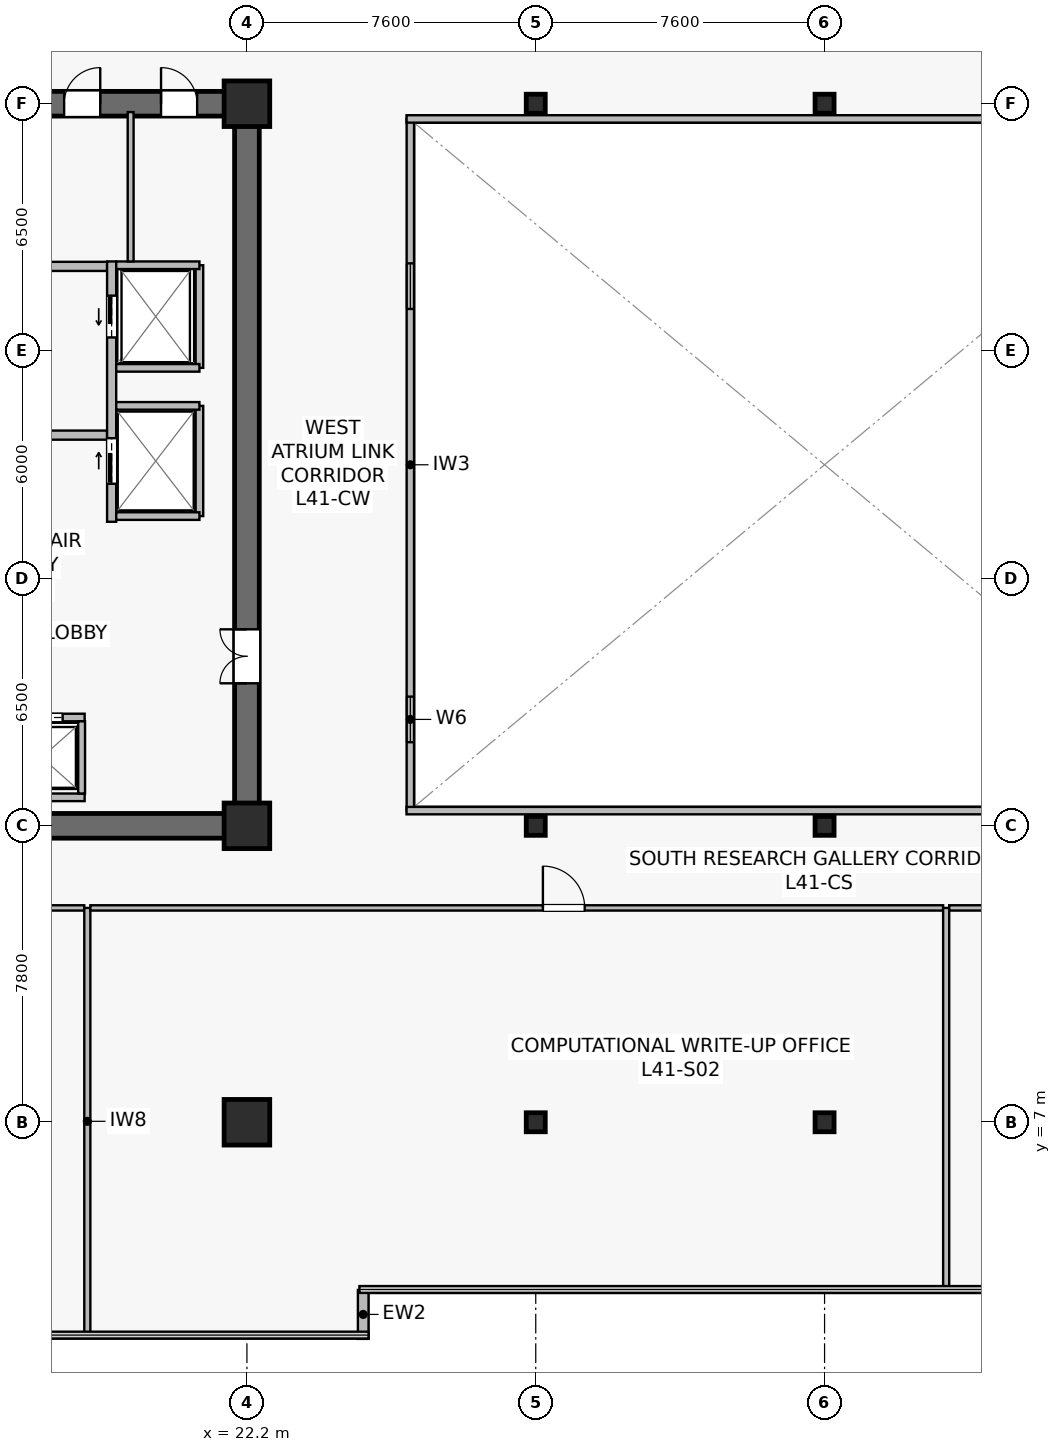
"""IFC4 building model, lengths in metres.
Left out: names, types, materials, properties, quantities, classifications, styles, units other than length and angle.
Written with IfcOpenShell. Run it as: python <this file> out.ifc"""

import sys

from ifc_helpers import new_model, si_unit, direction, frame, frame_2d, origin, origin_2d, place, context, subcontext, project, spatial, rectangle, hollow_rectangle, extrude, source, transform, mapped, element, fill, save


model = new_model("IFC4")
c1 = context("Model", 3, precision=1e-05, world=origin(), true_north=direction((0.0, 1.0)))
c2 = subcontext(c1, "Body", "Model", "MODEL_VIEW")
j1 = project(units=[si_unit("LENGTHUNIT", "METRE"), si_unit("PLANEANGLEUNIT", "RADIAN")], contexts=[c1])
p1 = place(None, origin())
s1 = spatial("IfcSite", under=j1, at=p1, CompositionType="ELEMENT")
p2 = place(p1, origin())
s2 = spatial("IfcBuilding", under=s1, at=p2, CompositionType="ELEMENT")
p3 = place(p2, frame((0.0, 0.0, 170.7)))
s3 = spatial("IfcBuildingStorey", under=s2, at=p3, CompositionType="ELEMENT", Elevation=170.7)
p4 = place(p3, frame((7.075, 14.8, 0.0), z_axis=(0.0, 0.0, 1.0), x_axis=(1.0, 0.0, 0.0)))
e1 = element("IfcWall", 1, at=p4, inside=s3, PredefinedType="SHEAR", context=c2, shape_type="SweptSolid", body=[
    extrude(rectangle(XDim=15.45, YDim=0.65, at=frame_2d((7.725, 0.0))), origin(), (0.0, 0.0, 1.0), 3.79),
])
p5 = place(p3, frame((7.075, 33.8, 0.0), z_axis=(0.0, 0.0, 1.0), x_axis=(1.0, 0.0, 0.0)))
e2 = element("IfcWall", 2, at=p5, inside=s3, PredefinedType="SHEAR", context=c2, shape_type="SweptSolid", body=[
    extrude(rectangle(XDim=15.45, YDim=0.65, at=frame_2d((7.725, 0.0))), origin(), (0.0, 0.0, 1.0), 3.79),
])
p6 = place(p5, frame((5.25, 0.0, 0.0)))
e3 = element("IfcOpeningElement", 3, at=p6, cuts=e2, PredefinedType="OPENING", context=c2, shape_type="SweptSolid", body=[
    extrude(rectangle(XDim=0.95, YDim=2.15, at=frame_2d((0.475, 1.075))), frame((0.0, 0.335, 0.0), z_axis=(0.0, -1.0, 0.0), x_axis=(1.0, 0.0, 0.0)), (0.0, 0.0, 1.0), 0.67),
])
p7 = place(p5, frame((7.765, 0.0, 0.0)))
e4 = element("IfcOpeningElement", 4, at=p7, cuts=e2, PredefinedType="OPENING", context=c2, shape_type="SweptSolid", body=[
    extrude(rectangle(XDim=0.95, YDim=2.15, at=frame_2d((0.475, 1.075))), frame((0.0, 0.335, 0.0), z_axis=(0.0, -1.0, 0.0), x_axis=(1.0, 0.0, 0.0)), (0.0, 0.0, 1.0), 0.67),
])
p8 = place(p5, frame((10.315, 0.0, 0.0)))
e5 = element("IfcOpeningElement", 5, at=p8, cuts=e2, PredefinedType="OPENING", context=c2, shape_type="SweptSolid", body=[
    extrude(rectangle(XDim=0.95, YDim=2.15, at=frame_2d((0.475, 1.075))), frame((0.0, 0.335, 0.0), z_axis=(0.0, -1.0, 0.0), x_axis=(1.0, 0.0, 0.0)), (0.0, 0.0, 1.0), 0.67),
])
p9 = place(p5, frame((12.865, 0.0, 0.0)))
e6 = element("IfcOpeningElement", 6, at=p9, cuts=e2, PredefinedType="OPENING", context=c2, shape_type="SweptSolid", body=[
    extrude(rectangle(XDim=0.95, YDim=2.15, at=frame_2d((0.475, 1.075))), frame((0.0, 0.335, 0.0), z_axis=(0.0, -1.0, 0.0), x_axis=(1.0, 0.0, 0.0)), (0.0, 0.0, 1.0), 0.67),
])
p10 = place(p3, frame((22.2, 15.125, 0.0), z_axis=(0.0, 0.0, 1.0), x_axis=(0.0, 1.0, 0.0)))
e7 = element("IfcWall", 7, at=p10, inside=s3, PredefinedType="SHEAR", context=c2, shape_type="SweptSolid", body=[
    extrude(rectangle(XDim=18.35, YDim=0.65, at=frame_2d((9.175, 0.0))), origin(), (0.0, 0.0, 1.0), 3.79),
])
p11 = place(p10, frame((3.425, 0.0, 0.0)))
e8 = element("IfcOpeningElement", 8, at=p11, cuts=e7, PredefinedType="OPENING", context=c2, shape_type="SweptSolid", body=[
    extrude(rectangle(XDim=1.42, YDim=2.2, at=frame_2d((0.71, 1.1))), frame((0.0, 0.335, 0.0), z_axis=(0.0, -1.0, 0.0), x_axis=(1.0, 0.0, 0.0)), (0.0, 0.0, 1.0), 0.67),
])
m1 = source(origin(), c2, "Body", "SweptSolid", [
    extrude(rectangle(XDim=1.2, YDim=1.2, at=origin_2d()), origin(), (0.0, 0.0, 1.0), 4.1),
])
for number, where, z_axis, x_axis in (
    (9, (22.2, 7.0, 0.0), (0.0, 0.0, 1.0), (1.0, 0.0, 0.0)),
    (10, (22.2, 14.8, 0.0), (0.0, 0.0, 1.0), (1.0, 0.0, 0.0)),
    (11, (22.2, 33.8, 0.0), (0.0, 0.0, 1.0), (1.0, 0.0, 0.0)),
):
    element("IfcColumn", number, at=place(p3, frame(where, z_axis=z_axis, x_axis=x_axis)), inside=s3, PredefinedType="COLUMN", context=c2, shape_type="MappedRepresentation", body=[
        mapped(m1, transform((0.0, 0.0, 0.0), scale=1.0)),
    ])
m2 = source(origin(), c2, "Body", "SweptSolid", [
    extrude(hollow_rectangle(XDim=0.5, YDim=0.5, WallThickness=0.022, at=origin_2d()), origin(), (0.0, 0.0, 1.0), 4.1),
])
for number, where, z_axis, x_axis in (
    (12, (29.8, 7.0, 0.0), (0.0, 0.0, 1.0), (1.0, 0.0, 0.0)),
    (13, (29.8, 14.8, 0.0), (0.0, 0.0, 1.0), (1.0, 0.0, 0.0)),
    (14, (29.8, 33.8, 0.0), (0.0, 0.0, 1.0), (1.0, 0.0, 0.0)),
    (15, (37.4, 7.0, 0.0), (0.0, 0.0, 1.0), (1.0, 0.0, 0.0)),
    (16, (37.4, 14.8, 0.0), (0.0, 0.0, 1.0), (1.0, 0.0, 0.0)),
    (17, (37.4, 33.8, 0.0), (0.0, 0.0, 1.0), (1.0, 0.0, 0.0)),
):
    element("IfcColumn", number, at=place(p3, frame(where, z_axis=z_axis, x_axis=x_axis)), inside=s3, PredefinedType="COLUMN", context=c2, shape_type="MappedRepresentation", body=[
        mapped(m2, transform((0.0, 0.0, 0.0), scale=1.0)),
    ])
p12 = place(p3, frame((25.26, 1.3, 0.0), z_axis=(0.0, 0.0, 1.0), x_axis=(0.0, 1.0, 0.0)))
e18 = element("IfcWall", 18, at=p12, inside=s3, PredefinedType="STANDARD", context=c2, shape_type="SweptSolid", body=[
    extrude(rectangle(XDim=1.288, YDim=0.28, at=frame_2d((0.644, 0.0))), origin(), (0.0, 0.0, 1.0), 3.79),
])
p13 = place(p3, frame((11.6, 25.08, 0.0), z_axis=(0.0, 0.0, 1.0), x_axis=(1.0, 0.0, 0.0)))
e19 = element("IfcWall", 19, at=p13, inside=s3, PredefinedType="SOLIDWALL", context=c2, shape_type="SweptSolid", body=[
    extrude(rectangle(XDim=6.92, YDim=0.24, at=frame_2d((3.46, 0.0))), origin(), (0.0, 0.0, 1.0), 3.187),
])
p14 = place(p13, frame((2.6, 0.0, 0.0)))
e20 = element("IfcOpeningElement", 20, at=p14, cuts=e19, PredefinedType="OPENING", context=c2, shape_type="SweptSolid", body=[
    extrude(rectangle(XDim=1.2, YDim=2.16, at=frame_2d((0.6, 1.08))), frame((0.0, 0.13, 0.0), z_axis=(0.0, -1.0, 0.0), x_axis=(1.0, 0.0, 0.0)), (0.0, 0.0, 1.0), 0.26),
])
p15 = place(p3, frame((11.6, 29.52, 0.0), z_axis=(0.0, 0.0, 1.0), x_axis=(1.0, 0.0, 0.0)))
e21 = element("IfcWall", 21, at=p15, inside=s3, PredefinedType="SOLIDWALL", context=c2, shape_type="SweptSolid", body=[
    extrude(rectangle(XDim=6.92, YDim=0.24, at=frame_2d((3.46, 0.0))), origin(), (0.0, 0.0, 1.0), 3.187),
])
p16 = place(p3, frame((18.64, 22.8, 0.0), z_axis=(0.0, 0.0, 1.0), x_axis=(0.0, 1.0, 0.0)))
e22 = element("IfcWall", 22, at=p16, inside=s3, PredefinedType="SOLIDWALL", context=c2, shape_type="SweptSolid", body=[
    extrude(rectangle(XDim=6.85, YDim=0.24, at=frame_2d((3.425, 0.0))), origin(), (0.0, 0.0, 1.0), 2.925),
])
p17 = place(p16, frame((4.85, 0.0, 0.0)))
e23 = element("IfcOpeningElement", 23, at=p17, cuts=e22, PredefinedType="OPENING", context=c2, shape_type="SweptSolid", body=[
    extrude(rectangle(XDim=1.1, YDim=2.22, at=frame_2d((0.55, 1.11))), frame((0.0, 0.13, 0.0), z_axis=(0.0, -1.0, 0.0), x_axis=(1.0, 0.0, 0.0)), (0.0, 0.0, 1.0), 0.26),
])
p18 = place(p16, frame((1.0, 0.0, 0.0)))
e24 = element("IfcOpeningElement", 24, at=p18, cuts=e22, PredefinedType="OPENING", context=c2, shape_type="SweptSolid", body=[
    extrude(rectangle(XDim=1.2, YDim=2.22, at=frame_2d((0.6, 1.11))), frame((0.0, 0.13, 0.0), z_axis=(0.0, -1.0, 0.0), x_axis=(1.0, 0.0, 0.0)), (0.0, 0.0, 1.0), 0.26),
])
p19 = place(p3, frame((15.67, 17.65, 0.0), z_axis=(0.0, 0.0, 1.0), x_axis=(1.0, 0.0, 0.0)))
e25 = element("IfcWall", 25, at=p19, inside=s3, PredefinedType="SOLIDWALL", context=c2, shape_type="SweptSolid", body=[
    extrude(rectangle(XDim=2.26, YDim=0.2, at=frame_2d((1.13, 0.0))), origin(), (0.0, 0.0, 1.0), 3.79),
])
p20 = place(p19, frame((0.58, 0.0, 0.0)))
e26 = element("IfcOpeningElement", 26, at=p20, cuts=e25, PredefinedType="OPENING", context=c2, shape_type="SweptSolid", body=[
    extrude(rectangle(XDim=1.1, YDim=2.22, at=frame_2d((0.55, 1.11))), frame((0.0, 0.11, 0.0), z_axis=(0.0, -1.0, 0.0), x_axis=(1.0, 0.0, 0.0)), (0.0, 0.0, 1.0), 0.22),
])
p21 = place(p3, frame((15.67, 15.55, 0.0), z_axis=(0.0, 0.0, 1.0), x_axis=(1.0, 0.0, 0.0)))
e27 = element("IfcWall", 27, at=p21, inside=s3, PredefinedType="SOLIDWALL", context=c2, shape_type="SweptSolid", body=[
    extrude(rectangle(XDim=2.26, YDim=0.2, at=frame_2d((1.13, 0.0))), origin(), (0.0, 0.0, 1.0), 3.79),
])
p22 = place(p3, frame((17.85, 15.65, 0.0), z_axis=(0.0, 0.0, 1.0), x_axis=(0.0, 1.0, 0.0)))
e28 = element("IfcWall", 28, at=p22, inside=s3, PredefinedType="SOLIDWALL", context=c2, shape_type="SweptSolid", body=[
    extrude(rectangle(XDim=1.9, YDim=0.18, at=frame_2d((0.95, 0.0))), origin(), (0.0, 0.0, 1.0), 3.79),
])
p23 = place(p3, frame((20.95, 26.85, 0.0), z_axis=(0.0, 0.0, 1.0), x_axis=(0.0, 1.0, 0.0)))
e29 = element("IfcWall", 29, at=p23, inside=s3, PredefinedType="SOLIDWALL", context=c2, shape_type="SweptSolid", body=[
    extrude(rectangle(XDim=2.7, YDim=0.2, at=frame_2d((1.35, 0.0))), origin(), (0.0, 0.0, 1.0), 3.79),
])
p24 = place(p3, frame((18.76, 29.55, 0.0), z_axis=(0.0, 0.0, 1.0), x_axis=(1.0, 0.0, 0.0)))
e30 = element("IfcWall", 30, at=p24, inside=s3, PredefinedType="SOLIDWALL", context=c2, shape_type="SweptSolid", body=[
    extrude(rectangle(XDim=2.19, YDim=0.2, at=frame_2d((1.095, 0.0))), origin(), (0.0, 0.0, 1.0), 3.79),
])
p25 = place(p3, frame((18.76, 26.85, 0.0), z_axis=(0.0, 0.0, 1.0), x_axis=(1.0, 0.0, 0.0)))
e31 = element("IfcWall", 31, at=p25, inside=s3, PredefinedType="SOLIDWALL", context=c2, shape_type="SweptSolid", body=[
    extrude(rectangle(XDim=2.19, YDim=0.2, at=frame_2d((1.095, 0.0))), origin(), (0.0, 0.0, 1.0), 3.187),
])
p26 = place(p3, frame((20.95, 22.95, 0.0), z_axis=(0.0, 0.0, 1.0), x_axis=(0.0, 1.0, 0.0)))
e32 = element("IfcWall", 32, at=p26, inside=s3, PredefinedType="SOLIDWALL", context=c2, shape_type="SweptSolid", body=[
    extrude(rectangle(XDim=2.9, YDim=0.2, at=frame_2d((1.45, 0.0))), origin(), (0.0, 0.0, 1.0), 2.925),
])
for number, where, z_axis, x_axis in (
    (33, (18.76, 25.85, 0.0), (0.0, 0.0, 1.0), (1.0, 0.0, 0.0)),
    (34, (18.76, 22.95, 0.0), (0.0, 0.0, 1.0), (1.0, 0.0, 0.0)),
):
    element("IfcWall", number, at=place(p3, frame(where, z_axis=z_axis, x_axis=x_axis)), inside=s3, PredefinedType="SOLIDWALL", context=c2, shape_type="SweptSolid", body=[
        extrude(rectangle(XDim=2.19, YDim=0.2, at=frame_2d((1.095, 0.0))), origin(), (0.0, 0.0, 1.0), 3.79),
    ])
p27 = place(p3, frame((19.14, 29.65, 0.0), z_axis=(0.0, 0.0, 1.0), x_axis=(0.0, 1.0, 0.0)))
e35 = element("IfcWall", 35, at=p27, inside=s3, PredefinedType="PLUMBINGWALL", context=c2, shape_type="SweptSolid", body=[
    extrude(rectangle(XDim=3.93, YDim=0.155, at=frame_2d((1.965, 0.0))), origin(), (0.0, 0.0, 1.0), 3.79),
])
p28 = place(p3, frame((26.5, 15.2, 0.0), z_axis=(0.0, 0.0, 1.0), x_axis=(0.0, 1.0, 0.0)))
e36 = element("IfcWall", 36, at=p28, inside=s3, PredefinedType="SOLIDWALL", context=c2, shape_type="SweptSolid", body=[
    extrude(rectangle(XDim=18.2, YDim=0.195, at=frame_2d((9.1, 0.0))), origin(), (0.0, 0.0, 1.0), 3.79),
])
p29 = place(p28, frame((1.8, 0.0, 0.9)))
e37 = element("IfcOpeningElement", 37, at=p29, cuts=e36, PredefinedType="OPENING", context=c2, shape_type="SweptSolid", body=[
    extrude(rectangle(XDim=1.2, YDim=1.35, at=frame_2d((0.6, 0.675))), frame((0.0, 0.107, 0.0), z_axis=(0.0, -1.0, 0.0), x_axis=(1.0, 0.0, 0.0)), (0.0, 0.0, 1.0), 0.215),
])
p30 = place(p28, frame((13.2, 0.0, 0.9)))
e38 = element("IfcOpeningElement", 38, at=p30, cuts=e36, PredefinedType="OPENING", context=c2, shape_type="SweptSolid", body=[
    extrude(rectangle(XDim=1.2, YDim=1.35, at=frame_2d((0.6, 0.675))), frame((0.0, 0.107, 0.0), z_axis=(0.0, -1.0, 0.0), x_axis=(1.0, 0.0, 0.0)), (0.0, 0.0, 1.0), 0.215),
])
for number, where, z_axis, x_axis in (
    (39, (26.4, 15.2, 0.0), (0.0, 0.0, 1.0), (1.0, 0.0, 0.0)),
    (40, (26.4, 33.4, 0.0), (0.0, 0.0, 1.0), (1.0, 0.0, 0.0)),
):
    element("IfcWall", number, at=place(p3, frame(where, z_axis=z_axis, x_axis=x_axis)), inside=s3, PredefinedType="SOLIDWALL", context=c2, shape_type="SweptSolid", body=[
        extrude(rectangle(XDim=22.0, YDim=0.195, at=frame_2d((11.0, 0.0))), origin(), (0.0, 0.0, 1.0), 3.79),
    ])
p31 = place(p3, frame((6.98, 12.64, 0.0), z_axis=(0.0, 0.0, 1.0), x_axis=(1.0, 0.0, 0.0)))
e41 = element("IfcWall", 41, at=p31, inside=s3, PredefinedType="PARTITIONING", context=c2, shape_type="SweptSolid", body=[
    extrude(rectangle(XDim=10.94, YDim=0.14, at=frame_2d((5.47, 0.0))), origin(), (0.0, 0.0, 1.0), 3.187),
])
p32 = place(p31, frame((4.372, 0.0, 0.0)))
e42 = element("IfcOpeningElement", 42, at=p32, cuts=e41, PredefinedType="OPENING", context=c2, shape_type="SweptSolid", body=[
    extrude(rectangle(XDim=1.1, YDim=2.18, at=frame_2d((0.55, 1.09))), frame((0.0, 0.08, 0.0), z_axis=(0.0, -1.0, 0.0), x_axis=(1.0, 0.0, 0.0)), (0.0, 0.0, 1.0), 0.16),
])
p33 = place(p3, frame((18.0, 1.41, 0.0), z_axis=(0.0, 0.0, 1.0), x_axis=(0.0, 1.0, 0.0)))
e43 = element("IfcWall", 43, at=p33, inside=s3, PredefinedType="PARTITIONING", context=c2, shape_type="SweptSolid", body=[
    extrude(rectangle(XDim=11.23, YDim=0.16, at=frame_2d((5.615, 0.0))), origin(), (0.0, 0.0, 1.0), 3.075),
])
p34 = place(p3, frame((18.08, 12.64, 0.0), z_axis=(0.0, 0.0, 1.0), x_axis=(1.0, 0.0, 0.0)))
e44 = element("IfcWall", 44, at=p34, inside=s3, PredefinedType="PARTITIONING", context=c2, shape_type="SweptSolid", body=[
    extrude(rectangle(XDim=22.44, YDim=0.14, at=frame_2d((11.22, 0.0))), origin(), (0.0, 0.0, 1.0), 3.187),
])
p35 = place(p34, frame((11.908, 0.0, 0.0)))
e45 = element("IfcOpeningElement", 45, at=p35, cuts=e44, PredefinedType="OPENING", context=c2, shape_type="SweptSolid", body=[
    extrude(rectangle(XDim=1.1, YDim=2.18, at=frame_2d((0.55, 1.09))), frame((0.0, 0.08, 0.0), z_axis=(0.0, -1.0, 0.0), x_axis=(1.0, 0.0, 0.0)), (0.0, 0.0, 1.0), 0.16),
])
p36 = place(p3, frame((40.6, 2.61, 0.0), z_axis=(0.0, 0.0, 1.0), x_axis=(0.0, 1.0, 0.0)))
e46 = element("IfcWall", 46, at=p36, inside=s3, PredefinedType="PARTITIONING", context=c2, shape_type="SweptSolid", body=[
    extrude(rectangle(XDim=10.03, YDim=0.16, at=frame_2d((5.015, 0.0))), origin(), (0.0, 0.0, 1.0), 3.075),
])
p37 = place(p3, frame((40.68, 12.64, 0.0), z_axis=(0.0, 0.0, 1.0), x_axis=(1.0, 0.0, 0.0)))
e47 = element("IfcWall", 47, at=p37, inside=s3, PredefinedType="PARTITIONING", context=c2, shape_type="SweptSolid", body=[
    extrude(rectangle(XDim=16.04, YDim=0.14, at=frame_2d((8.02, 0.0))), origin(), (0.0, 0.0, 1.0), 3.187),
])
p38 = place(p37, frame((6.615, 0.0, 0.0)))
e48 = element("IfcOpeningElement", 48, at=p38, cuts=e47, PredefinedType="OPENING", context=c2, shape_type="SweptSolid", body=[
    extrude(rectangle(XDim=1.1, YDim=2.18, at=frame_2d((0.55, 1.09))), frame((0.0, 0.08, 0.0), z_axis=(0.0, -1.0, 0.0), x_axis=(1.0, 0.0, 0.0)), (0.0, 0.0, 1.0), 0.16),
])
m3 = source(origin(), c2, "Body", "SweptSolid", [
    extrude(rectangle(XDim=1.2, YDim=1.35, at=frame_2d((0.6, 0.675))), frame((0.0, 0.03, 0.0), z_axis=(0.0, -1.0, 0.0), x_axis=(1.0, 0.0, 0.0)), (0.0, 0.0, 1.0), 0.06),
])
p39 = place(p29, origin())
e49 = element("IfcWindow", 49, at=p39, inside=s3, PartitioningType="SINGLE_PANEL", PredefinedType="WINDOW", context=c2, shape_type="MappedRepresentation", body=[
    mapped(m3, transform((0.0, 0.0, 0.0), scale=1.0)),
])
fill(e37, e49)
p40 = place(p30, origin())
e50 = element("IfcWindow", 50, at=p40, inside=s3, PartitioningType="SINGLE_PANEL", PredefinedType="WINDOW", context=c2, shape_type="MappedRepresentation", body=[
    mapped(m3, transform((0.0, 0.0, 0.0), scale=1.0)),
])
fill(e38, e50)
m4 = source(origin(), c2, "Body", "SweptSolid", [
    extrude(rectangle(XDim=1.1, YDim=2.22, at=frame_2d((0.55, 1.11))), frame((0.0, 0.025, 0.0), z_axis=(0.0, -1.0, 0.0), x_axis=(1.0, 0.0, 0.0)), (0.0, 0.0, 1.0), 0.05),
])
p41 = place(p20, origin())
e51 = element("IfcDoor", 51, at=p41, inside=s3, OperationType="SLIDING_TO_RIGHT", PredefinedType="USERDEFINED", context=c2, shape_type="MappedRepresentation", body=[
    mapped(m4, transform((0.0, 0.0, 0.0), scale=1.0)),
])
fill(e26, e51)
p42 = place(p17, origin())
e52 = element("IfcDoor", 52, at=p42, inside=s3, OperationType="SLIDING_TO_LEFT", PredefinedType="USERDEFINED", context=c2, shape_type="MappedRepresentation", body=[
    mapped(m4, transform((0.0, 0.0, 0.0), scale=1.0)),
])
fill(e23, e52)
m5 = source(origin(), c2, "Body", "SweptSolid", [
    extrude(rectangle(XDim=1.2, YDim=2.22, at=frame_2d((0.6, 1.11))), frame((0.0, 0.025, 0.0), z_axis=(0.0, -1.0, 0.0), x_axis=(1.0, 0.0, 0.0)), (0.0, 0.0, 1.0), 0.05),
])
p43 = place(p18, origin())
e53 = element("IfcDoor", 53, at=p43, inside=s3, OperationType="SLIDING_TO_RIGHT", PredefinedType="USERDEFINED", context=c2, shape_type="MappedRepresentation", body=[
    mapped(m5, transform((0.0, 0.0, 0.0), scale=1.0)),
])
fill(e24, e53)
m6 = source(origin(), c2, "Body", "SweptSolid", [
    extrude(rectangle(XDim=1.42, YDim=2.2, at=frame_2d((0.71, 1.1))), frame((0.0, 0.025, 0.0), z_axis=(0.0, -1.0, 0.0), x_axis=(1.0, 0.0, 0.0)), (0.0, 0.0, 1.0), 0.05),
])
p44 = place(p11, origin())
e54 = element("IfcDoor", 54, at=p44, inside=s3, OperationType="DOUBLE_DOOR_SINGLE_SWING", PredefinedType="DOOR", context=c2, shape_type="MappedRepresentation", body=[
    mapped(m6, transform((0.0, 0.0, 0.0), scale=1.0)),
])
fill(e8, e54)
m7 = source(origin(), c2, "Body", "SweptSolid", [
    extrude(rectangle(XDim=0.95, YDim=2.15, at=frame_2d((0.475, 1.075))), frame((0.0, 0.025, 0.0), z_axis=(0.0, -1.0, 0.0), x_axis=(1.0, 0.0, 0.0)), (0.0, 0.0, 1.0), 0.05),
])
p45 = place(p8, origin())
e55 = element("IfcDoor", 55, at=p45, inside=s3, OperationType="SINGLE_SWING_RIGHT", PredefinedType="DOOR", context=c2, shape_type="MappedRepresentation", body=[
    mapped(m7, transform((0.0, 0.0, 0.0), scale=1.0)),
])
fill(e5, e55)
p46 = place(p9, origin())
e56 = element("IfcDoor", 56, at=p46, inside=s3, OperationType="SINGLE_SWING_LEFT", PredefinedType="DOOR", context=c2, shape_type="MappedRepresentation", body=[
    mapped(m7, transform((0.0, 0.0, 0.0), scale=1.0)),
])
fill(e6, e56)
m8 = source(origin(), c2, "Body", "SweptSolid", [
    extrude(rectangle(XDim=1.1, YDim=2.18, at=frame_2d((0.55, 1.09))), frame((0.0, 0.025, 0.0), z_axis=(0.0, -1.0, 0.0), x_axis=(1.0, 0.0, 0.0)), (0.0, 0.0, 1.0), 0.05),
])
p47 = place(p35, origin())
e57 = element("IfcDoor", 57, at=p47, inside=s3, OperationType="SINGLE_SWING_LEFT", PredefinedType="DOOR", context=c2, shape_type="MappedRepresentation", body=[
    mapped(m8, transform((0.0, 0.0, 0.0), scale=1.0)),
])
fill(e45, e57)
save(model, sys.argv[1])
